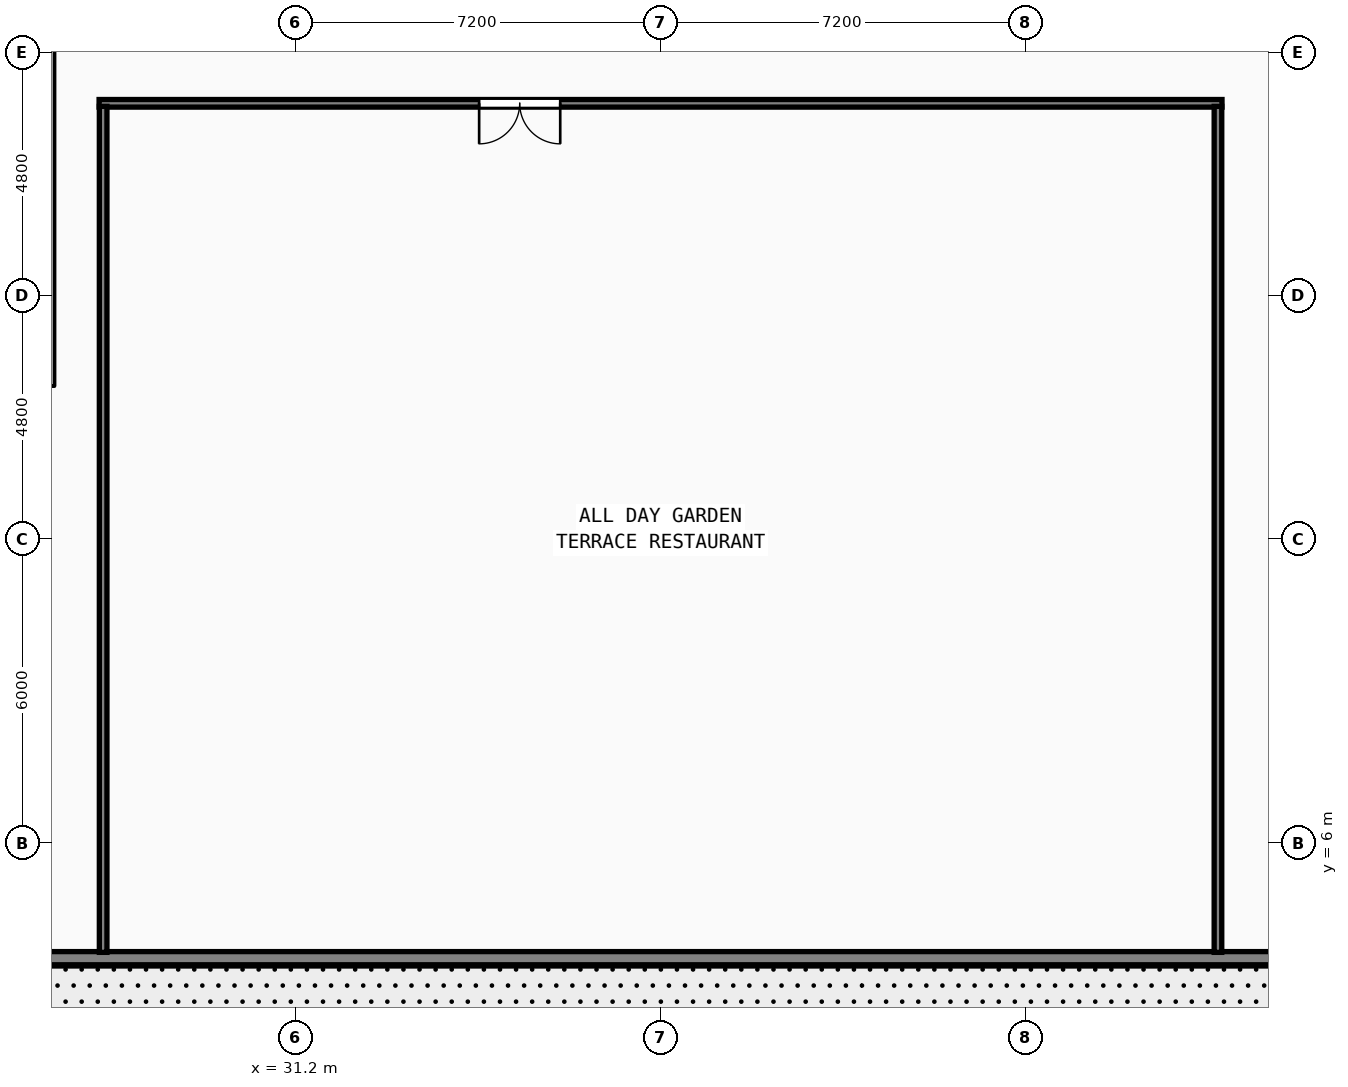
"""IFC4 building model, lengths in metres.
Left out: names, types, materials, properties, quantities, classifications, styles, units other than length and angle.
Written with IfcOpenShell. Run it as: python <this file> out.ifc"""

import sys

from ifc_helpers import new_model, si_unit, direction, frame, frame_2d, origin, origin_2d, place, context, subcontext, project, spatial, rectangle, hollow_rectangle, i_section, extrude, element, fill, save


model = new_model("IFC4")
c1 = context("Model", 3, precision=1e-05, world=origin(), true_north=direction((0.0, 1.0)))
c2 = subcontext(c1, "Body", "Model", "MODEL_VIEW")
j1 = project(units=[si_unit("LENGTHUNIT", "METRE"), si_unit("PLANEANGLEUNIT", "RADIAN")], contexts=[c1])
p1 = place(None, origin())
s1 = spatial("IfcSite", under=j1, at=p1, CompositionType="ELEMENT")
p2 = place(p1, origin())
s2 = spatial("IfcBuilding", under=s1, at=p2, CompositionType="ELEMENT")
p3 = place(p2, frame((0.0, 0.0, 5.4)))
s3 = spatial("IfcBuildingStorey", under=s2, at=p3, CompositionType="ELEMENT", Elevation=5.4)
for number, where, z_axis, x_axis in (
    (1, (31.2, 21.6, 0.0), (0.0, 0.0, 1.0), (1.0, 0.0, 0.0)),
    (2, (45.6, 21.6, 0.0), (0.0, 0.0, 1.0), (1.0, 0.0, 0.0)),
):
    element("IfcColumn", number, at=place(p3, frame(where, z_axis=z_axis, x_axis=x_axis)), inside=s3, PredefinedType="COLUMN", context=c2, shape_type="SweptSolid", body=[
        extrude(hollow_rectangle(XDim=1.3, YDim=1.3, WallThickness=0.048, at=origin_2d()), origin(), (0.0, 0.0, 1.0), 4.8),
    ])
for number, where, z_axis, x_axis in (
    (3, (31.2, 6.0, 0.0), (0.0, 0.0, 1.0), (1.0, 0.0, 0.0)),
    (4, (45.6, 6.0, 0.0), (0.0, 0.0, 1.0), (1.0, 0.0, 0.0)),
):
    element("IfcColumn", number, at=place(p3, frame(where, z_axis=z_axis, x_axis=x_axis)), inside=s3, PredefinedType="COLUMN", context=c2, shape_type="SweptSolid", body=[
        extrude(i_section(OverallWidth=0.3, OverallDepth=0.3, WebThickness=0.01, FlangeThickness=0.015, FilletRadius=0.018, at=origin_2d()), origin(), (0.0, 0.0, 1.0), 4.8),
    ])
p4 = place(p3, frame((3.599, 3.73, 0.0), z_axis=(0.0, 0.0, 1.0), x_axis=(1.0, 0.0, 0.0)))
e5 = element("IfcWall", 5, at=p4, inside=s3, PredefinedType="SOLIDWALL", context=c2, shape_type="SweptSolid", body=[
    extrude(rectangle(XDim=69.602, YDim=0.26, at=frame_2d((34.801, 0.0))), origin(), (0.0, 0.0, 1.0), 4.56),
])
p5 = place(p4, frame((69.382, 0.0, 0.0), z_axis=(0.0, 0.0, 1.0), x_axis=(-1.0, 0.0, 0.0)))
e6 = element("IfcOpeningElement", 6, at=p5, cuts=e5, PredefinedType="OPENING", context=c2, shape_type="SweptSolid", body=[
    extrude(rectangle(XDim=1.5, YDim=2.2, at=frame_2d((0.75, 1.1))), frame((0.0, 0.14, 0.0), z_axis=(0.0, -1.0, 0.0), x_axis=(1.0, 0.0, 0.0)), (0.0, 0.0, 1.0), 0.28),
])
p6 = place(p3, frame((27.32, 20.6, 0.0), z_axis=(0.0, 0.0, 1.0), x_axis=(1.0, 0.0, 0.0)))
e7 = element("IfcWall", 7, at=p6, inside=s3, PredefinedType="PARTITIONING", context=c2, shape_type="SweptSolid", body=[
    extrude(rectangle(XDim=22.16, YDim=0.15, at=frame_2d((11.08, 0.0))), origin(), (0.0, 0.0, 1.0), 4.56),
])
p7 = place(p6, frame((9.1, 0.0, 0.0), z_axis=(0.0, 0.0, 1.0), x_axis=(-1.0, 0.0, 0.0)))
e8 = element("IfcOpeningElement", 8, at=p7, cuts=e7, PredefinedType="OPENING", context=c2, shape_type="SweptSolid", body=[
    extrude(rectangle(XDim=1.6, YDim=2.25, at=frame_2d((0.8, 1.125))), frame((0.0, 0.085, 0.0), z_axis=(0.0, -1.0, 0.0), x_axis=(1.0, 0.0, 0.0)), (0.0, 0.0, 1.0), 0.17),
])
for number, where, z_axis, x_axis in (
    (9, (27.4, 3.845, 0.0), (0.0, 0.0, 1.0), (0.0, 1.0, 0.0)),
    (10, (49.4, 3.845, 0.0), (0.0, 0.0, 1.0), (0.0, 1.0, 0.0)),
):
    element("IfcWall", number, at=place(p3, frame(where, z_axis=z_axis, x_axis=x_axis)), inside=s3, PredefinedType="PARTITIONING", context=c2, shape_type="SweptSolid", body=[
        extrude(rectangle(XDim=16.695, YDim=0.15, at=frame_2d((8.348, 0.0))), origin(), (0.0, 0.0, 1.0), 4.56),
    ])
p8 = place(p7, origin())
e11 = element("IfcDoor", 11, at=p8, inside=s3, OperationType="DOUBLE_DOOR_SINGLE_SWING", PredefinedType="DOOR", context=c2, shape_type="SweptSolid", body=[
    extrude(rectangle(XDim=1.6, YDim=2.25, at=frame_2d((0.8, 1.125))), frame((0.0, 0.025, 0.0), z_axis=(0.0, -1.0, 0.0), x_axis=(1.0, 0.0, 0.0)), (0.0, 0.0, 1.0), 0.05),
])
fill(e8, e11)
save(model, sys.argv[1])
